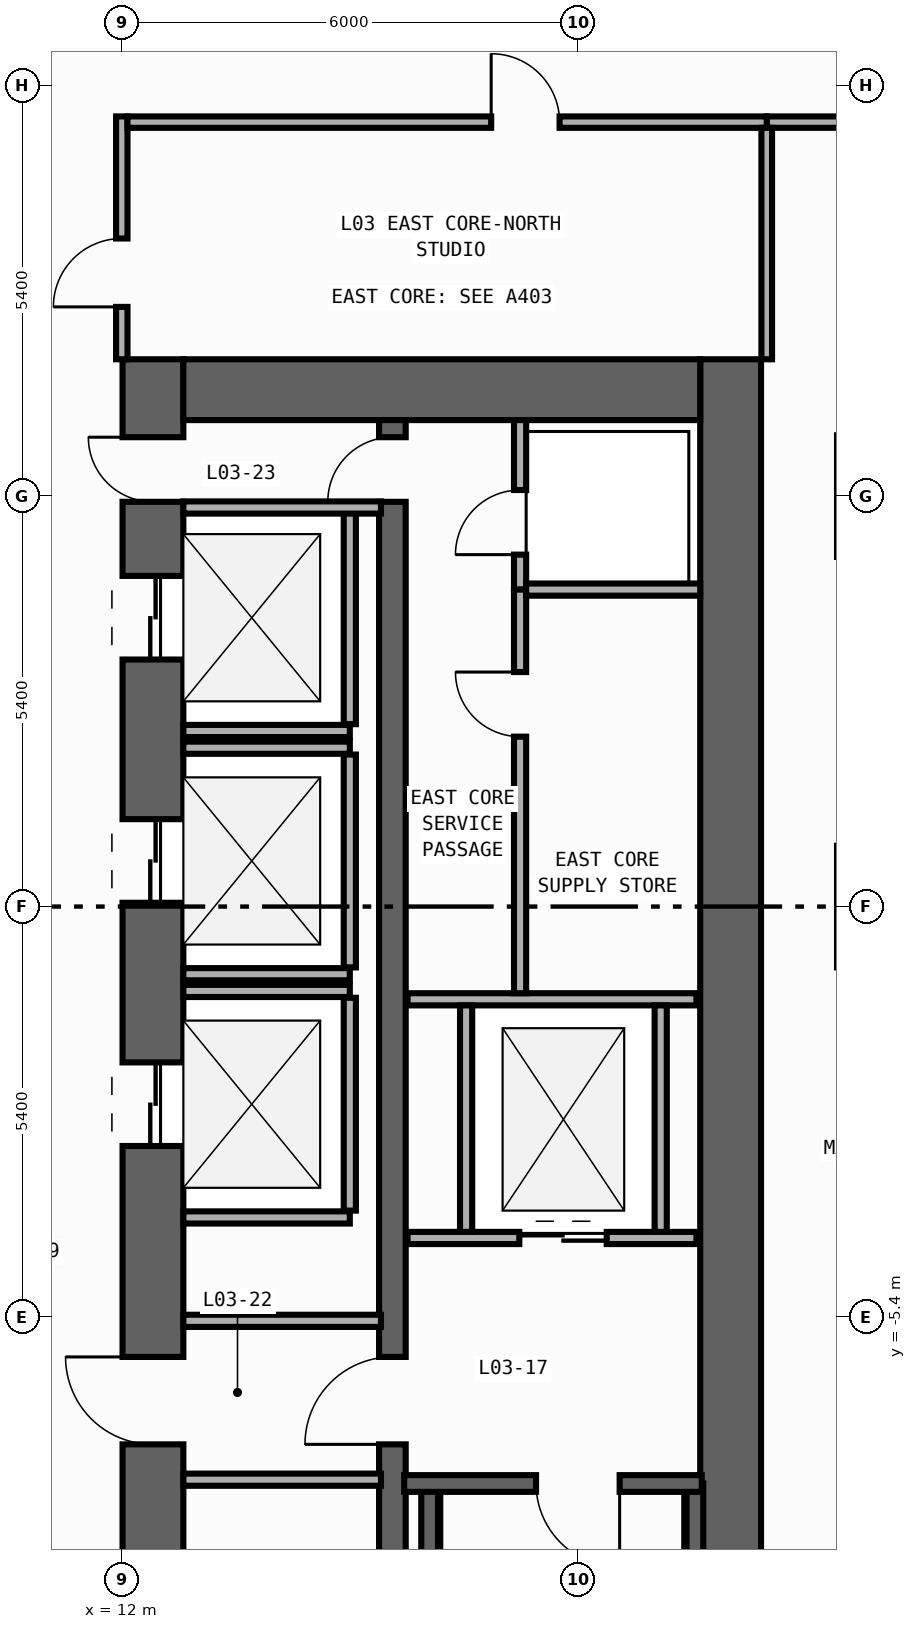
"""IFC4 building model, lengths in metres.
Left out: names, types, materials, properties, quantities, classifications, styles, units other than length and angle.
Written with IfcOpenShell. Run it as: python <this file> out.ifc"""

import sys

from ifc_helpers import new_model, si_unit, direction, frame, frame_2d, origin, place, context, subcontext, project, spatial, rectangle, extrude, element, fill, save


model = new_model("IFC4")
c1 = context("Model", 3, precision=1e-05, world=origin(), true_north=direction((0.0, 1.0)))
c2 = subcontext(c1, "Body", "Model", "MODEL_VIEW")
j1 = project(units=[si_unit("LENGTHUNIT", "METRE"), si_unit("PLANEANGLEUNIT", "RADIAN")], contexts=[c1])
p1 = place(None, origin())
s1 = spatial("IfcSite", under=j1, at=p1, CompositionType="ELEMENT")
p2 = place(p1, origin())
s2 = spatial("IfcBuilding", under=s1, at=p2, CompositionType="ELEMENT")
p3 = place(p2, frame((0.0, 0.0, 11.0)))
s3 = spatial("IfcBuildingStorey", under=s2, at=p3, CompositionType="ELEMENT", Elevation=11.0)
p4 = place(p3, frame((12.4, -19.8, 0.0), z_axis=(0.0, 0.0, 1.0), x_axis=(0.0, 1.0, 0.0)))
e1 = element("IfcWall", 1, at=p4, inside=s3, PredefinedType="SHEAR", context=c2, shape_type="SweptSolid", body=[
    extrude(rectangle(XDim=27.0, YDim=0.8, at=frame_2d((13.5, 0.0))), origin(), (0.0, 0.0, 1.0), 4.7),
])
p5 = place(p4, frame((23.05, 0.0, 0.0)))
e2 = element("IfcOpeningElement", 2, at=p5, cuts=e1, PredefinedType="OPENING", context=c2, shape_type="SweptSolid", body=[
    extrude(rectangle(XDim=1.1, YDim=2.2, at=frame_2d((0.55, 1.1))), frame((0.0, 0.41, 0.0), z_axis=(0.0, -1.0, 0.0), x_axis=(1.0, 0.0, 0.0)), (0.0, 0.0, 1.0), 0.82),
])
p6 = place(p4, frame((19.85, 0.0, 0.0)))
e3 = element("IfcOpeningElement", 3, at=p6, cuts=e1, PredefinedType="OPENING", context=c2, shape_type="SweptSolid", body=[
    extrude(rectangle(XDim=1.1, YDim=2.2, at=frame_2d((0.55, 1.1))), frame((0.0, 0.41, 0.0), z_axis=(0.0, -1.0, 0.0), x_axis=(1.0, 0.0, 0.0)), (0.0, 0.0, 1.0), 0.82),
])
p7 = place(p4, frame((16.65, 0.0, 0.0)))
e4 = element("IfcOpeningElement", 4, at=p7, cuts=e1, PredefinedType="OPENING", context=c2, shape_type="SweptSolid", body=[
    extrude(rectangle(XDim=1.1, YDim=2.2, at=frame_2d((0.55, 1.1))), frame((0.0, 0.41, 0.0), z_axis=(0.0, -1.0, 0.0), x_axis=(1.0, 0.0, 0.0)), (0.0, 0.0, 1.0), 0.82),
])
p8 = place(p4, frame((10.175, 0.0, 0.0)))
e5 = element("IfcOpeningElement", 5, at=p8, cuts=e1, PredefinedType="OPENING", context=c2, shape_type="SweptSolid", body=[
    extrude(rectangle(XDim=0.85, YDim=2.1, at=frame_2d((0.425, 1.05))), frame((0.0, 0.41, 0.0), z_axis=(0.0, -1.0, 0.0), x_axis=(1.0, 0.0, 0.0)), (0.0, 0.0, 1.0), 0.82),
])
p9 = place(p4, frame((12.725, 0.0, 0.0)))
e6 = element("IfcOpeningElement", 6, at=p9, cuts=e1, PredefinedType="OPENING", context=c2, shape_type="SweptSolid", body=[
    extrude(rectangle(XDim=1.15, YDim=2.2, at=frame_2d((0.575, 1.1))), frame((0.0, 0.41, 0.0), z_axis=(0.0, -1.0, 0.0), x_axis=(1.0, 0.0, 0.0)), (0.0, 0.0, 1.0), 0.82),
])
p10 = place(p4, frame((25.125, 0.0, 0.0)))
e7 = element("IfcOpeningElement", 7, at=p10, cuts=e1, PredefinedType="OPENING", context=c2, shape_type="SweptSolid", body=[
    extrude(rectangle(XDim=0.85, YDim=2.1, at=frame_2d((0.425, 1.05))), frame((0.0, 0.41, 0.0), z_axis=(0.0, -1.0, 0.0), x_axis=(1.0, 0.0, 0.0)), (0.0, 0.0, 1.0), 0.82),
])
p11 = place(p3, frame((20.0, -19.8, 0.0), z_axis=(0.0, 0.0, 1.0), x_axis=(0.0, 1.0, 0.0)))
e8 = element("IfcWall", 8, at=p11, inside=s3, PredefinedType="SHEAR", context=c2, shape_type="SweptSolid", body=[
    extrude(rectangle(XDim=27.0, YDim=0.8, at=frame_2d((13.5, 0.0))), origin(), (0.0, 0.0, 1.0), 4.7),
])
p12 = place(p3, frame((12.8, 6.8, 0.0), z_axis=(0.0, 0.0, 1.0), x_axis=(1.0, 0.0, 0.0)))
e9 = element("IfcWall", 9, at=p12, inside=s3, PredefinedType="SHEAR", context=c2, shape_type="SweptSolid", body=[
    extrude(rectangle(XDim=6.8, YDim=0.8, at=frame_2d((3.4, 0.0))), origin(), (0.0, 0.0, 1.0), 4.7),
])
p13 = place(p3, frame((15.55, -19.0, 0.0), z_axis=(0.0, 0.0, 1.0), x_axis=(0.0, 1.0, 0.0)))
e10 = element("IfcWall", 10, at=p13, inside=s3, PredefinedType="SHEAR", context=c2, shape_type="SweptSolid", body=[
    extrude(rectangle(XDim=25.4, YDim=0.35, at=frame_2d((12.7, 0.0))), origin(), (0.0, 0.0, 1.0), 4.7),
])
p14 = place(p13, frame((11.925, 0.0, 0.0)))
e11 = element("IfcOpeningElement", 11, at=p14, cuts=e10, PredefinedType="OPENING", context=c2, shape_type="SweptSolid", body=[
    extrude(rectangle(XDim=1.15, YDim=2.2, at=frame_2d((0.575, 1.1))), frame((0.0, 0.185, 0.0), z_axis=(0.0, -1.0, 0.0), x_axis=(1.0, 0.0, 0.0)), (0.0, 0.0, 1.0), 0.37),
])
p15 = place(p13, frame((24.325, 0.0, 0.0)))
e12 = element("IfcOpeningElement", 12, at=p15, cuts=e10, PredefinedType="OPENING", context=c2, shape_type="SweptSolid", body=[
    extrude(rectangle(XDim=0.85, YDim=2.1, at=frame_2d((0.425, 1.05))), frame((0.0, 0.185, 0.0), z_axis=(0.0, -1.0, 0.0), x_axis=(1.0, 0.0, 0.0)), (0.0, 0.0, 1.0), 0.37),
])
for number, where, z_axis, x_axis in (
    (13, (16.04, -18.89, 0.0), (0.0, 0.0, 1.0), (0.0, 1.0, 0.0)),
    (14, (19.53, -18.89, 0.0), (0.0, 0.0, 1.0), (0.0, 1.0, 0.0)),
):
    element("IfcWall", number, at=place(p3, frame(where, z_axis=z_axis, x_axis=x_axis)), inside=s3, PredefinedType="SHEAR", context=c2, shape_type="SweptSolid", body=[
        extrude(rectangle(XDim=11.3, YDim=0.22, at=frame_2d((5.65, 0.0))), origin(), (0.0, 0.0, 1.0), 4.7),
    ])
p16 = place(p3, frame((19.62, -7.59, 0.0), z_axis=(0.0, 0.0, 1.0), x_axis=(-1.0, 0.0, 0.0)))
e15 = element("IfcWall", 15, at=p16, inside=s3, PredefinedType="SHEAR", context=c2, shape_type="SweptSolid", body=[
    extrude(rectangle(XDim=3.915, YDim=0.22, at=frame_2d((1.958, 0.0))), origin(), (0.0, 0.0, 1.0), 4.7),
])
p17 = place(p16, frame((1.08, 0.0, 0.0)))
e16 = element("IfcOpeningElement", 16, at=p17, cuts=e15, PredefinedType="OPENING", context=c2, shape_type="SweptSolid", body=[
    extrude(rectangle(XDim=1.1, YDim=2.2, at=frame_2d((0.55, 1.1))), frame((0.0, 0.12, 0.0), z_axis=(0.0, -1.0, 0.0), x_axis=(1.0, 0.0, 0.0)), (0.0, 0.0, 1.0), 0.24),
])
p18 = place(p3, frame((12.8, 2.31, 0.0), z_axis=(0.0, 0.0, 1.0), x_axis=(1.0, 0.0, 0.0)))
e17 = element("IfcWall", 17, at=p18, inside=s3, PredefinedType="STANDARD", context=c2, shape_type="SweptSolid", body=[
    extrude(rectangle(XDim=2.19, YDim=0.16, at=frame_2d((1.095, 0.0))), origin(), (0.0, 0.0, 1.0), 4.7),
])
p19 = place(p3, frame((14.99, 2.4, 0.0), z_axis=(0.0, 0.0, 1.0), x_axis=(0.0, 1.0, 0.0)))
e18 = element("IfcWall", 18, at=p19, inside=s3, PredefinedType="STANDARD", context=c2, shape_type="SweptSolid", body=[
    extrude(rectangle(XDim=2.8, YDim=0.16, at=frame_2d((1.4, 0.0))), origin(), (0.0, 0.0, 1.0), 4.7),
])
for number, where, z_axis, x_axis in (
    (19, (12.8, -0.89, 0.0), (0.0, 0.0, 1.0), (1.0, 0.0, 0.0)),
    (20, (12.8, 2.09, 0.0), (0.0, 0.0, 1.0), (1.0, 0.0, 0.0)),
):
    element("IfcWall", number, at=place(p3, frame(where, z_axis=z_axis, x_axis=x_axis)), inside=s3, PredefinedType="STANDARD", context=c2, shape_type="SweptSolid", body=[
        extrude(rectangle(XDim=2.19, YDim=0.16, at=frame_2d((1.095, 0.0))), origin(), (0.0, 0.0, 1.0), 4.7),
    ])
p20 = place(p3, frame((14.99, -0.8, 0.0), z_axis=(0.0, 0.0, 1.0), x_axis=(0.0, 1.0, 0.0)))
e21 = element("IfcWall", 21, at=p20, inside=s3, PredefinedType="STANDARD", context=c2, shape_type="SweptSolid", body=[
    extrude(rectangle(XDim=2.8, YDim=0.16, at=frame_2d((1.4, 0.0))), origin(), (0.0, 0.0, 1.0), 4.7),
])
for number, where, z_axis, x_axis in (
    (22, (12.8, -4.09, 0.0), (0.0, 0.0, 1.0), (1.0, 0.0, 0.0)),
    (23, (12.8, -1.11, 0.0), (0.0, 0.0, 1.0), (1.0, 0.0, 0.0)),
):
    element("IfcWall", number, at=place(p3, frame(where, z_axis=z_axis, x_axis=x_axis)), inside=s3, PredefinedType="STANDARD", context=c2, shape_type="SweptSolid", body=[
        extrude(rectangle(XDim=2.19, YDim=0.16, at=frame_2d((1.095, 0.0))), origin(), (0.0, 0.0, 1.0), 4.7),
    ])
p21 = place(p3, frame((14.99, -4.0, 0.0), z_axis=(0.0, 0.0, 1.0), x_axis=(0.0, 1.0, 0.0)))
e24 = element("IfcWall", 24, at=p21, inside=s3, PredefinedType="STANDARD", context=c2, shape_type="SweptSolid", body=[
    extrude(rectangle(XDim=2.8, YDim=0.16, at=frame_2d((1.4, 0.0))), origin(), (0.0, 0.0, 1.0), 4.7),
])
p22 = place(p3, frame((15.75, -4.36, 0.0), z_axis=(0.0, 0.0, 1.0), x_axis=(1.0, 0.0, 0.0)))
e25 = element("IfcWall", 25, at=p22, inside=s3, PredefinedType="STANDARD", context=c2, shape_type="SweptSolid", body=[
    extrude(rectangle(XDim=3.8, YDim=0.16, at=frame_2d((1.9, 0.0))), origin(), (0.0, 0.0, 1.0), 4.7),
])
p23 = place(p22, frame((1.47, 0.0, 0.0)))
e26 = element("IfcOpeningElement", 26, at=p23, cuts=e25, PredefinedType="OPENING", context=c2, shape_type="SweptSolid", body=[
    extrude(rectangle(XDim=1.15, YDim=2.2, at=frame_2d((0.575, 1.1))), frame((0.0, 0.09, 0.0), z_axis=(0.0, -1.0, 0.0), x_axis=(1.0, 0.0, 0.0)), (0.0, 0.0, 1.0), 0.18),
])
p24 = place(p3, frame((15.75, -1.22, 0.0), z_axis=(0.0, 0.0, 1.0), x_axis=(1.0, 0.0, 0.0)))
e27 = element("IfcWall", 27, at=p24, inside=s3, PredefinedType="STANDARD", context=c2, shape_type="SweptSolid", body=[
    extrude(rectangle(XDim=3.8, YDim=0.16, at=frame_2d((1.9, 0.0))), origin(), (0.0, 0.0, 1.0), 4.7),
])
for number, where, z_axis, x_axis in (
    (28, (16.52, -4.28, 0.0), (0.0, 0.0, 1.0), (0.0, 1.0, 0.0)),
    (29, (19.08, -4.28, 0.0), (0.0, 0.0, 1.0), (0.0, 1.0, 0.0)),
):
    element("IfcWall", number, at=place(p3, frame(where, z_axis=z_axis, x_axis=x_axis)), inside=s3, PredefinedType="STANDARD", context=c2, shape_type="SweptSolid", body=[
        extrude(rectangle(XDim=2.98, YDim=0.16, at=frame_2d((1.49, 0.0))), origin(), (0.0, 0.0, 1.0), 4.7),
    ])
for number, where, z_axis, x_axis in (
    (30, (12.8, -5.45, 0.0), (0.0, 0.0, 1.0), (1.0, 0.0, 0.0)),
    (31, (12.8, -7.54, 0.0), (0.0, 0.0, 1.0), (1.0, 0.0, 0.0)),
    (32, (12.8, 5.25, 0.0), (0.0, 0.0, 1.0), (1.0, 0.0, 0.0)),
):
    element("IfcWall", number, at=place(p3, frame(where, z_axis=z_axis, x_axis=x_axis)), inside=s3, PredefinedType="STANDARD", context=c2, shape_type="SweptSolid", body=[
        extrude(rectangle(XDim=2.6, YDim=0.16, at=frame_2d((1.3, 0.0))), origin(), (0.0, 0.0, 1.0), 4.7),
    ])
p25 = place(p3, frame((17.23, 4.17, 0.0), z_axis=(0.0, 0.0, 1.0), x_axis=(0.0, 1.0, 0.0)))
e33 = element("IfcWall", 33, at=p25, inside=s3, PredefinedType="PARTITIONING", context=c2, shape_type="SweptSolid", body=[
    extrude(rectangle(XDim=2.23, YDim=0.16, at=frame_2d((1.115, 0.0))), origin(), (0.0, 0.0, 1.0), 4.7),
])
p26 = place(p25, frame((0.46, 0.0, 0.0)))
e34 = element("IfcOpeningElement", 34, at=p26, cuts=e33, PredefinedType="OPENING", context=c2, shape_type="SweptSolid", body=[
    extrude(rectangle(XDim=0.85, YDim=2.1, at=frame_2d((0.425, 1.05))), frame((0.0, 0.09, 0.0), z_axis=(0.0, -1.0, 0.0), x_axis=(1.0, 0.0, 0.0)), (0.0, 0.0, 1.0), 0.18),
])
p27 = place(p3, frame((17.23, -1.14, 0.0), z_axis=(0.0, 0.0, 1.0), x_axis=(0.0, 1.0, 0.0)))
e35 = element("IfcWall", 35, at=p27, inside=s3, PredefinedType="PARTITIONING", context=c2, shape_type="SweptSolid", body=[
    extrude(rectangle(XDim=5.31, YDim=0.16, at=frame_2d((2.655, 0.0))), origin(), (0.0, 0.0, 1.0), 4.7),
])
p28 = place(p27, frame((3.375, 0.0, 0.0)))
e36 = element("IfcOpeningElement", 36, at=p28, cuts=e35, PredefinedType="OPENING", context=c2, shape_type="SweptSolid", body=[
    extrude(rectangle(XDim=0.85, YDim=2.1, at=frame_2d((0.425, 1.05))), frame((0.0, 0.09, 0.0), z_axis=(0.0, -1.0, 0.0), x_axis=(1.0, 0.0, 0.0)), (0.0, 0.0, 1.0), 0.18),
])
p29 = place(p3, frame((17.31, 4.17, 0.0), z_axis=(0.0, 0.0, 1.0), x_axis=(1.0, 0.0, 0.0)))
e37 = element("IfcWall", 37, at=p29, inside=s3, PredefinedType="PARTITIONING", context=c2, shape_type="SweptSolid", body=[
    extrude(rectangle(XDim=2.29, YDim=0.16, at=frame_2d((1.145, 0.0))), origin(), (0.0, 0.0, 1.0), 4.7),
])
p30 = place(p3, frame((11.99, 7.2, 0.0), z_axis=(0.0, 0.0, 1.0), x_axis=(0.0, 1.0, 0.0)))
e38 = element("IfcWall", 38, at=p30, inside=s3, PredefinedType="PARTITIONING", context=c2, shape_type="SweptSolid", body=[
    extrude(rectangle(XDim=3.195, YDim=0.15, at=frame_2d((1.598, 0.0))), origin(), (0.0, 0.0, 1.0), 4.7),
])
p31 = place(p30, frame((0.689, 0.0, 0.0)))
e39 = element("IfcOpeningElement", 39, at=p31, cuts=e38, PredefinedType="OPENING", context=c2, shape_type="SweptSolid", body=[
    extrude(rectangle(XDim=0.9, YDim=2.15, at=frame_2d((0.45, 1.075))), frame((0.0, 0.085, 0.0), z_axis=(0.0, -1.0, 0.0), x_axis=(1.0, 0.0, 0.0)), (0.0, 0.0, 1.0), 0.17),
])
p32 = place(p3, frame((20.475, 10.32, 0.0), z_axis=(0.0, 0.0, 1.0), x_axis=(1.0, 0.0, 0.0)))
e40 = element("IfcWall", 40, at=p32, inside=s3, PredefinedType="PARTITIONING", context=c2, shape_type="SweptSolid", body=[
    extrude(rectangle(XDim=3.97, YDim=0.15, at=frame_2d((1.985, 0.0))), origin(), (0.0, 0.0, 1.0), 4.7),
])
p33 = place(p32, frame((2.61, 0.0, 0.0)))
e41 = element("IfcOpeningElement", 41, at=p33, cuts=e40, PredefinedType="OPENING", context=c2, shape_type="SweptSolid", body=[
    extrude(rectangle(XDim=0.9, YDim=2.15, at=frame_2d((0.45, 1.075))), frame((0.0, 0.085, 0.0), z_axis=(0.0, -1.0, 0.0), x_axis=(1.0, 0.0, 0.0)), (0.0, 0.0, 1.0), 0.17),
])
p34 = place(p3, frame((12.065, 10.32, 0.0), z_axis=(0.0, 0.0, 1.0), x_axis=(1.0, 0.0, 0.0)))
e42 = element("IfcWall", 42, at=p34, inside=s3, PredefinedType="PARTITIONING", context=c2, shape_type="SweptSolid", body=[
    extrude(rectangle(XDim=8.41, YDim=0.15, at=frame_2d((4.205, 0.0))), origin(), (0.0, 0.0, 1.0), 4.7),
])
p35 = place(p34, frame((4.785, 0.0, 0.0)))
e43 = element("IfcOpeningElement", 43, at=p35, cuts=e42, PredefinedType="OPENING", context=c2, shape_type="SweptSolid", body=[
    extrude(rectangle(XDim=0.9, YDim=2.15, at=frame_2d((0.45, 1.075))), frame((0.0, 0.085, 0.0), z_axis=(0.0, -1.0, 0.0), x_axis=(1.0, 0.0, 0.0)), (0.0, 0.0, 1.0), 0.17),
])
p36 = place(p3, frame((20.475, 7.2, 0.0), z_axis=(0.0, 0.0, 1.0), x_axis=(0.0, 1.0, 0.0)))
e44 = element("IfcWall", 44, at=p36, inside=s3, PredefinedType="PARTITIONING", context=c2, shape_type="SweptSolid", body=[
    extrude(rectangle(XDim=3.045, YDim=0.14, at=frame_2d((1.522, 0.0))), origin(), (0.0, 0.0, 1.0), 4.7),
])
p37 = place(p17, origin())
e45 = element("IfcDoor", 45, at=p37, inside=s3, OperationType="SINGLE_SWING_LEFT", PredefinedType="DOOR", context=c2, shape_type="SweptSolid", body=[
    extrude(rectangle(XDim=1.1, YDim=2.2, at=frame_2d((0.55, 1.1))), frame((0.0, 0.025, 0.0), z_axis=(0.0, -1.0, 0.0), x_axis=(1.0, 0.0, 0.0)), (0.0, 0.0, 1.0), 0.05),
])
fill(e16, e45)
p38 = place(p5, origin())
e46 = element("IfcDoor", 46, at=p38, inside=s3, OperationType="DOUBLE_DOOR_SLIDING", PredefinedType="DOOR", context=c2, shape_type="SweptSolid", body=[
    extrude(rectangle(XDim=1.1, YDim=2.2, at=frame_2d((0.55, 1.1))), frame((0.0, 0.025, 0.0), z_axis=(0.0, -1.0, 0.0), x_axis=(1.0, 0.0, 0.0)), (0.0, 0.0, 1.0), 0.05),
])
fill(e2, e46)
p39 = place(p6, origin())
e47 = element("IfcDoor", 47, at=p39, inside=s3, OperationType="DOUBLE_DOOR_SLIDING", PredefinedType="DOOR", context=c2, shape_type="SweptSolid", body=[
    extrude(rectangle(XDim=1.1, YDim=2.2, at=frame_2d((0.55, 1.1))), frame((0.0, 0.025, 0.0), z_axis=(0.0, -1.0, 0.0), x_axis=(1.0, 0.0, 0.0)), (0.0, 0.0, 1.0), 0.05),
])
fill(e3, e47)
p40 = place(p7, origin())
e48 = element("IfcDoor", 48, at=p40, inside=s3, OperationType="DOUBLE_DOOR_SLIDING", PredefinedType="DOOR", context=c2, shape_type="SweptSolid", body=[
    extrude(rectangle(XDim=1.1, YDim=2.2, at=frame_2d((0.55, 1.1))), frame((0.0, 0.025, 0.0), z_axis=(0.0, -1.0, 0.0), x_axis=(1.0, 0.0, 0.0)), (0.0, 0.0, 1.0), 0.05),
])
fill(e4, e48)
p41 = place(p9, origin())
e49 = element("IfcDoor", 49, at=p41, inside=s3, OperationType="SINGLE_SWING_RIGHT", PredefinedType="DOOR", context=c2, shape_type="SweptSolid", body=[
    extrude(rectangle(XDim=1.15, YDim=2.2, at=frame_2d((0.575, 1.1))), frame((0.0, 0.025, 0.0), z_axis=(0.0, -1.0, 0.0), x_axis=(1.0, 0.0, 0.0)), (0.0, 0.0, 1.0), 0.05),
])
fill(e6, e49)
p42 = place(p14, origin())
e50 = element("IfcDoor", 50, at=p42, inside=s3, OperationType="SINGLE_SWING_LEFT", PredefinedType="DOOR", context=c2, shape_type="SweptSolid", body=[
    extrude(rectangle(XDim=1.15, YDim=2.2, at=frame_2d((0.575, 1.1))), frame((0.0, 0.025, 0.0), z_axis=(0.0, -1.0, 0.0), x_axis=(1.0, 0.0, 0.0)), (0.0, 0.0, 1.0), 0.05),
])
fill(e11, e50)
p43 = place(p10, origin())
e51 = element("IfcDoor", 51, at=p43, inside=s3, OperationType="SINGLE_SWING_RIGHT", PredefinedType="DOOR", context=c2, shape_type="SweptSolid", body=[
    extrude(rectangle(XDim=0.85, YDim=2.1, at=frame_2d((0.425, 1.05))), frame((0.0, 0.025, 0.0), z_axis=(0.0, -1.0, 0.0), x_axis=(1.0, 0.0, 0.0)), (0.0, 0.0, 1.0), 0.05),
])
fill(e7, e51)
p44 = place(p15, origin())
e52 = element("IfcDoor", 52, at=p44, inside=s3, OperationType="SINGLE_SWING_LEFT", PredefinedType="DOOR", context=c2, shape_type="SweptSolid", body=[
    extrude(rectangle(XDim=0.85, YDim=2.1, at=frame_2d((0.425, 1.05))), frame((0.0, 0.025, 0.0), z_axis=(0.0, -1.0, 0.0), x_axis=(1.0, 0.0, 0.0)), (0.0, 0.0, 1.0), 0.05),
])
fill(e12, e52)
p45 = place(p23, origin())
e53 = element("IfcDoor", 53, at=p45, inside=s3, OperationType="DOUBLE_DOOR_SLIDING", PredefinedType="DOOR", context=c2, shape_type="SweptSolid", body=[
    extrude(rectangle(XDim=1.15, YDim=2.2, at=frame_2d((0.575, 1.1))), frame((0.0, 0.025, 0.0), z_axis=(0.0, -1.0, 0.0), x_axis=(1.0, 0.0, 0.0)), (0.0, 0.0, 1.0), 0.05),
])
fill(e26, e53)
p46 = place(p26, origin())
e54 = element("IfcDoor", 54, at=p46, inside=s3, OperationType="SINGLE_SWING_LEFT", PredefinedType="DOOR", context=c2, shape_type="SweptSolid", body=[
    extrude(rectangle(XDim=0.85, YDim=2.1, at=frame_2d((0.425, 1.05))), frame((0.0, 0.025, 0.0), z_axis=(0.0, -1.0, 0.0), x_axis=(1.0, 0.0, 0.0)), (0.0, 0.0, 1.0), 0.05),
])
fill(e34, e54)
p47 = place(p28, origin())
e55 = element("IfcDoor", 55, at=p47, inside=s3, OperationType="SINGLE_SWING_RIGHT", PredefinedType="DOOR", context=c2, shape_type="SweptSolid", body=[
    extrude(rectangle(XDim=0.85, YDim=2.1, at=frame_2d((0.425, 1.05))), frame((0.0, 0.025, 0.0), z_axis=(0.0, -1.0, 0.0), x_axis=(1.0, 0.0, 0.0)), (0.0, 0.0, 1.0), 0.05),
])
fill(e36, e55)
p48 = place(p31, origin())
e56 = element("IfcDoor", 56, at=p48, inside=s3, OperationType="SINGLE_SWING_LEFT", PredefinedType="DOOR", context=c2, shape_type="SweptSolid", body=[
    extrude(rectangle(XDim=0.9, YDim=2.15, at=frame_2d((0.45, 1.075))), frame((0.0, 0.025, 0.0), z_axis=(0.0, -1.0, 0.0), x_axis=(1.0, 0.0, 0.0)), (0.0, 0.0, 1.0), 0.05),
])
fill(e39, e56)
p49 = place(p35, origin())
e57 = element("IfcDoor", 57, at=p49, inside=s3, OperationType="SINGLE_SWING_LEFT", PredefinedType="DOOR", context=c2, shape_type="SweptSolid", body=[
    extrude(rectangle(XDim=0.9, YDim=2.15, at=frame_2d((0.45, 1.075))), frame((0.0, 0.025, 0.0), z_axis=(0.0, -1.0, 0.0), x_axis=(1.0, 0.0, 0.0)), (0.0, 0.0, 1.0), 0.05),
])
fill(e43, e57)
save(model, sys.argv[1])
